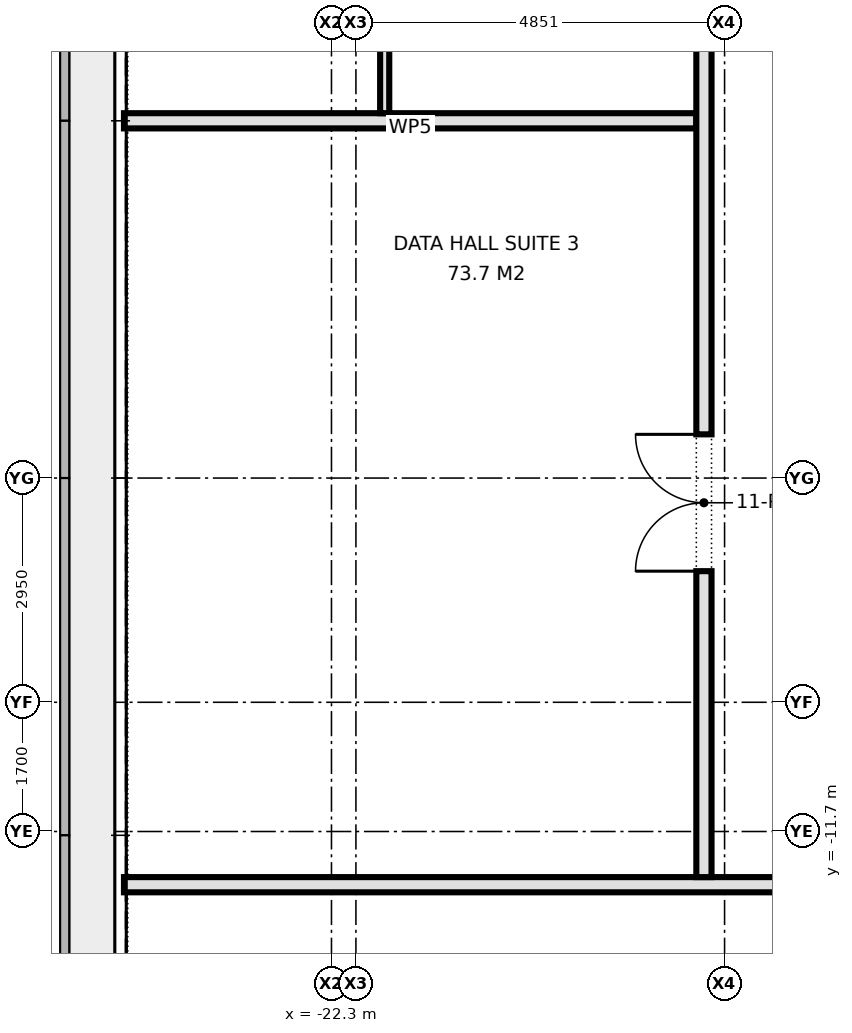
"""IFC4 building model, lengths in metres.
Left out: names, types, materials, properties, quantities, classifications, styles, units other than length and angle.
Written with IfcOpenShell. Run it as: python <this file> out.ifc"""

import sys

from ifc_helpers import new_model, si_unit, direction, frame, frame_2d, origin, place, context, subcontext, project, spatial, rectangle, extrude, element, fill, save


model = new_model("IFC4")
c1 = context("Model", 3, precision=1e-05, world=origin(), true_north=direction((0.0, 1.0)))
c2 = subcontext(c1, "Body", "Model", "MODEL_VIEW")
j1 = project(units=[si_unit("LENGTHUNIT", "METRE"), si_unit("PLANEANGLEUNIT", "RADIAN")], contexts=[c1])
p1 = place(None, origin())
s1 = spatial("IfcSite", under=j1, at=p1, CompositionType="ELEMENT")
p2 = place(p1, origin())
s2 = spatial("IfcBuilding", under=s1, at=p2, CompositionType="ELEMENT")
p3 = place(p2, frame((0.0, 0.0, 49.7)))
s3 = spatial("IfcBuildingStorey", under=s2, at=p3, CompositionType="ELEMENT", Elevation=49.7)
p4 = place(p3, frame((-25.03, -12.4, 0.0), z_axis=(0.0, 0.0, 1.0), x_axis=(1.0, 0.0, 0.0)))
e1 = element("IfcWall", 1, at=p4, inside=s3, PredefinedType="PARTITIONING", context=c2, shape_type="SweptSolid", body=[
    extrude(rectangle(XDim=50.06, YDim=0.2, at=frame_2d((25.03, 0.0))), origin(), (0.0, 0.0, 1.0), 4.575),
])
p5 = place(p4, frame((18.95, 0.0, 0.0)))
e2 = element("IfcOpeningElement", 2, at=p5, cuts=e1, PredefinedType="OPENING", context=c2, shape_type="SweptSolid", body=[
    extrude(rectangle(XDim=1.8, YDim=2.1, at=frame_2d((0.9, 1.05))), frame((0.0, 0.11, 0.0), z_axis=(0.0, -1.0, 0.0), x_axis=(1.0, 0.0, 0.0)), (0.0, 0.0, 1.0), 0.22),
])
p6 = place(p4, frame((37.86, 0.0, 0.0)))
e3 = element("IfcOpeningElement", 3, at=p6, cuts=e1, PredefinedType="OPENING", context=c2, shape_type="SweptSolid", body=[
    extrude(rectangle(XDim=1.8, YDim=2.1, at=frame_2d((0.9, 1.05))), frame((0.0, 0.11, 0.0), z_axis=(0.0, -1.0, 0.0), x_axis=(1.0, 0.0, 0.0)), (0.0, 0.0, 1.0), 0.22),
])
p7 = place(p4, frame((32.98, 0.0, 0.0)))
e4 = element("IfcOpeningElement", 4, at=p7, cuts=e1, PredefinedType="OPENING", context=c2, shape_type="SweptSolid", body=[
    extrude(rectangle(XDim=1.2, YDim=2.1, at=frame_2d((0.6, 1.05))), frame((0.0, 0.11, 0.0), z_axis=(0.0, -1.0, 0.0), x_axis=(1.0, 0.0, 0.0)), (0.0, 0.0, 1.0), 0.22),
])
p8 = place(p3, frame((-25.03, -2.35, 0.0), z_axis=(0.0, 0.0, 1.0), x_axis=(1.0, 0.0, 0.0)))
e5 = element("IfcWall", 5, at=p8, inside=s3, PredefinedType="PARTITIONING", context=c2, shape_type="SweptSolid", body=[
    extrude(rectangle(XDim=7.53, YDim=0.2, at=frame_2d((3.765, 0.0))), origin(), (0.0, 0.0, 1.0), 4.575),
])
p9 = place(p3, frame((-17.4, -12.3, 0.0), z_axis=(0.0, 0.0, 1.0), x_axis=(0.0, 1.0, 0.0)))
e6 = element("IfcWall", 6, at=p9, inside=s3, PredefinedType="PARTITIONING", context=c2, shape_type="SweptSolid", body=[
    extrude(rectangle(XDim=28.2, YDim=0.2, at=frame_2d((14.1, 0.0))), origin(), (0.0, 0.0, 1.0), 4.575),
])
p10 = place(p9, frame((4.025, 0.0, 0.0)))
e7 = element("IfcOpeningElement", 7, at=p10, cuts=e6, PredefinedType="OPENING", context=c2, shape_type="SweptSolid", body=[
    extrude(rectangle(XDim=1.8, YDim=2.1, at=frame_2d((0.9, 1.05))), frame((0.0, 0.11, 0.0), z_axis=(0.0, -1.0, 0.0), x_axis=(1.0, 0.0, 0.0)), (0.0, 0.0, 1.0), 0.22),
])
p11 = place(p9, frame((20.525, 0.0, 0.0)))
e8 = element("IfcOpeningElement", 8, at=p11, cuts=e6, PredefinedType="OPENING", context=c2, shape_type="SweptSolid", body=[
    extrude(rectangle(XDim=1.8, YDim=2.1, at=frame_2d((0.9, 1.05))), frame((0.0, 0.11, 0.0), z_axis=(0.0, -1.0, 0.0), x_axis=(1.0, 0.0, 0.0)), (0.0, 0.0, 1.0), 0.22),
])
p12 = place(p9, frame((10.95, 0.0, 0.0)))
e9 = element("IfcOpeningElement", 9, at=p12, cuts=e6, PredefinedType="OPENING", context=c2, shape_type="SweptSolid", body=[
    extrude(rectangle(XDim=1.0, YDim=2.1, at=frame_2d((0.5, 1.05))), frame((0.0, 0.11, 0.0), z_axis=(0.0, -1.0, 0.0), x_axis=(1.0, 0.0, 0.0)), (0.0, 0.0, 1.0), 0.22),
])
p13 = place(p9, frame((13.95, 0.0, 0.0)))
e10 = element("IfcOpeningElement", 10, at=p13, cuts=e6, PredefinedType="OPENING", context=c2, shape_type="SweptSolid", body=[
    extrude(rectangle(XDim=1.0, YDim=2.1, at=frame_2d((0.5, 1.05))), frame((0.0, 0.11, 0.0), z_axis=(0.0, -1.0, 0.0), x_axis=(1.0, 0.0, 0.0)), (0.0, 0.0, 1.0), 0.22),
])
p14 = place(p9, frame((16.55, 0.0, 0.0)))
e11 = element("IfcOpeningElement", 11, at=p14, cuts=e6, PredefinedType="OPENING", context=c2, shape_type="SweptSolid", body=[
    extrude(rectangle(XDim=1.0, YDim=2.1, at=frame_2d((0.5, 1.05))), frame((0.0, 0.11, 0.0), z_axis=(0.0, -1.0, 0.0), x_axis=(1.0, 0.0, 0.0)), (0.0, 0.0, 1.0), 0.22),
])
p15 = place(p3, frame((-21.6, -2.25, 0.0), z_axis=(0.0, 0.0, 1.0), x_axis=(0.0, 1.0, 0.0)))
e12 = element("IfcWall", 12, at=p15, inside=s3, PredefinedType="PARTITIONING", context=c2, shape_type="SweptSolid", body=[
    extrude(rectangle(XDim=8.04, YDim=0.12, at=frame_2d((4.02, 0.0))), origin(), (0.0, 0.0, 1.0), 4.575),
])
p16 = place(p10, origin())
e13 = element("IfcDoor", 13, at=p16, inside=s3, OperationType="DOUBLE_DOOR_SINGLE_SWING", PredefinedType="DOOR", context=c2, shape_type="SweptSolid", body=[
    extrude(rectangle(XDim=1.8, YDim=2.1, at=frame_2d((0.9, 1.05))), frame((0.0, 0.025, 0.0), z_axis=(0.0, -1.0, 0.0), x_axis=(1.0, 0.0, 0.0)), (0.0, 0.0, 1.0), 0.05),
])
fill(e7, e13)
save(model, sys.argv[1])
